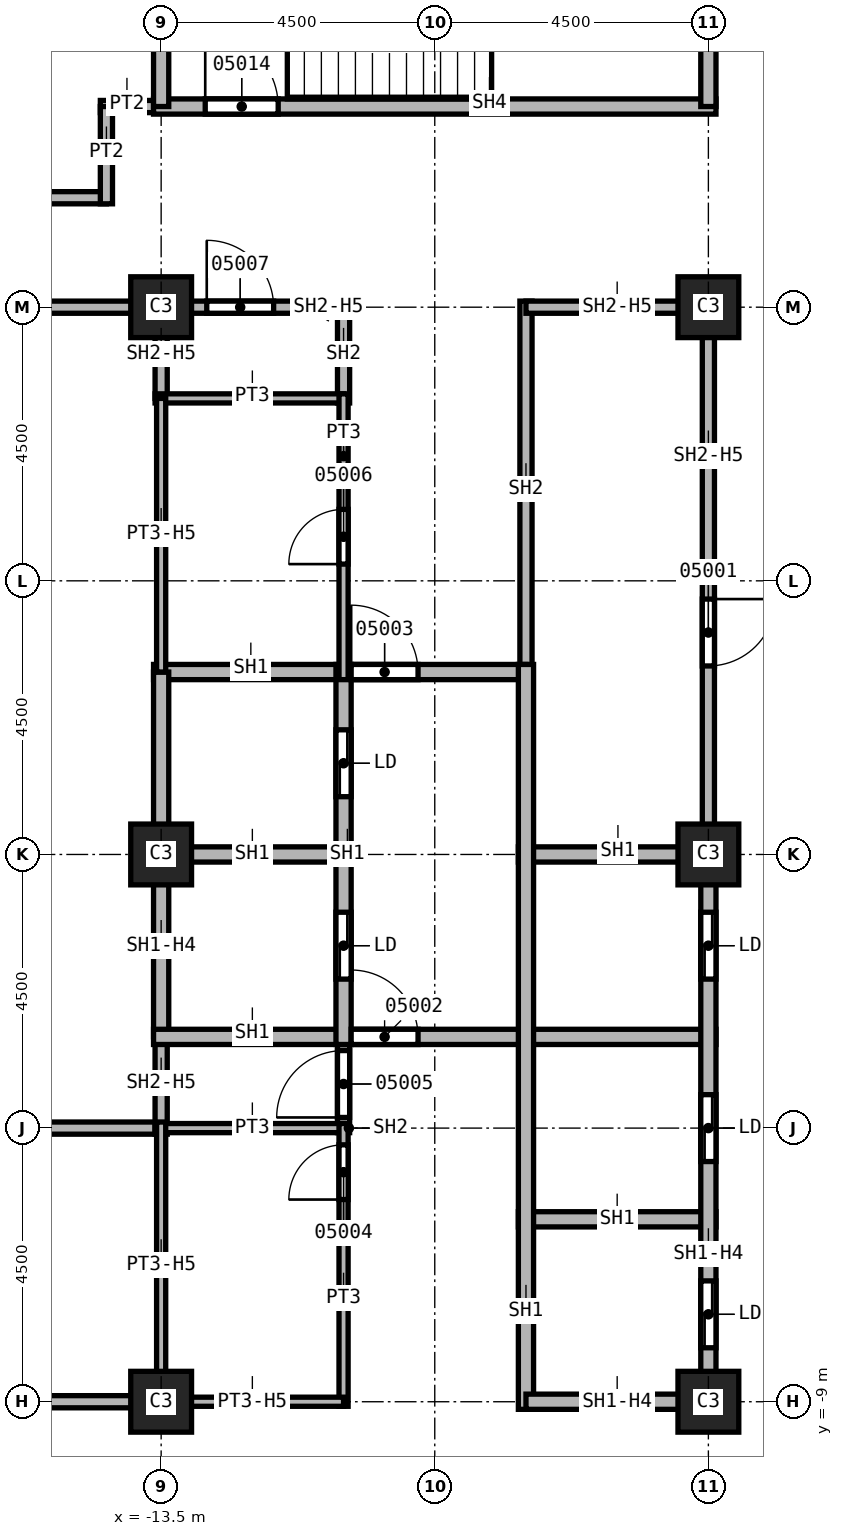
"""IFC4 building model, lengths in metres.
Left out: names, types, materials, properties, quantities, classifications, styles, units other than length and angle.
Written with IfcOpenShell. Run it as: python <this file> out.ifc"""

import sys

from ifc_helpers import new_model, si_unit, direction, frame, frame_2d, origin, origin_2d, place, context, subcontext, project, spatial, rectangle, extrude, element, fill, save


model = new_model("IFC4")
c1 = context("Model", 3, precision=1e-05, world=origin(), true_north=direction((0.0, 1.0)))
c2 = subcontext(c1, "Body", "Model", "MODEL_VIEW")
j1 = project(units=[si_unit("LENGTHUNIT", "METRE"), si_unit("PLANEANGLEUNIT", "RADIAN")], contexts=[c1])
p1 = place(None, origin())
s1 = spatial("IfcSite", under=j1, at=p1, CompositionType="ELEMENT")
p2 = place(p1, origin())
s2 = spatial("IfcBuilding", under=s1, at=p2, CompositionType="ELEMENT")
p3 = place(p2, frame((0.0, 0.0, 112.0)))
s3 = spatial("IfcBuildingStorey", under=s2, at=p3, CompositionType="ELEMENT", Elevation=112.0)
for number, where, z_axis, x_axis in (
    (1, (-4.5, 0.0, 0.0), (0.0, 0.0, 1.0), (1.0, 0.0, 0.0)),
    (2, (-4.5, 9.0, 0.0), (0.0, 0.0, 1.0), (1.0, 0.0, 0.0)),
    (3, (-4.5, -9.0, 0.0), (0.0, 0.0, 1.0), (1.0, 0.0, 0.0)),
    (4, (-13.5, 0.0, 0.0), (0.0, 0.0, 1.0), (1.0, 0.0, 0.0)),
    (5, (-13.5, 9.0, 0.0), (0.0, 0.0, 1.0), (1.0, 0.0, 0.0)),
    (6, (-13.5, -9.0, 0.0), (0.0, 0.0, 1.0), (1.0, 0.0, 0.0)),
):
    element("IfcColumn", number, at=place(p3, frame(where, z_axis=z_axis, x_axis=x_axis)), inside=s3, PredefinedType="COLUMN", context=c2, shape_type="SweptSolid", body=[
        extrude(rectangle(XDim=1.0, YDim=1.0, at=origin_2d()), origin(), (0.0, 0.0, 1.0), 3.7),
    ])
for number, where, z_axis, x_axis in (
    (7, (-18.0, -9.0, 0.0), (0.0, 0.0, 1.0), (1.0, 0.0, 0.0)),
    (8, (-18.0, -4.5, 0.0), (0.0, 0.0, 1.0), (1.0, 0.0, 0.0)),
):
    element("IfcWall", number, at=place(p3, frame(where, z_axis=z_axis, x_axis=x_axis)), inside=s3, PredefinedType="PARTITIONING", context=c2, shape_type="SweptSolid", body=[
        extrude(rectangle(XDim=4.5, YDim=0.2, at=frame_2d((2.25, 0.0))), origin(), (0.0, 0.0, 1.0), 3.7),
    ])
p4 = place(p3, frame((-18.0, 10.8, 0.0), z_axis=(0.0, 0.0, 1.0), x_axis=(1.0, 0.0, 0.0)))
e9 = element("IfcWall", 9, at=p4, inside=s3, PredefinedType="PARTITIONING", context=c2, shape_type="SweptSolid", body=[
    extrude(rectangle(XDim=3.6, YDim=0.2, at=frame_2d((1.8, 0.0))), origin(), (0.0, 0.0, 1.0), 3.7),
])
p5 = place(p4, frame((0.25, 0.0, 0.0)))
e10 = element("IfcOpeningElement", 10, at=p5, cuts=e9, PredefinedType="OPENING", context=c2, shape_type="SweptSolid", body=[
    extrude(rectangle(XDim=1.0, YDim=2.1, at=frame_2d((0.5, 1.05))), frame((0.0, 0.1, 0.0), z_axis=(0.0, -1.0, 0.0), x_axis=(1.0, 0.0, 0.0)), (0.0, 0.0, 1.0), 0.2),
])
p6 = place(p3, frame((-14.5, 12.3, 0.0), z_axis=(0.0, 0.0, 1.0), x_axis=(1.0, 0.0, 0.0)))
e11 = element("IfcWall", 11, at=p6, inside=s3, PredefinedType="PARTITIONING", context=c2, shape_type="SweptSolid", body=[
    extrude(rectangle(XDim=1.125, YDim=0.2, at=frame_2d((0.562, 0.0))), origin(), (0.0, 0.0, 1.0), 3.7),
])
p7 = place(p3, frame((-13.5, 9.0, 0.0), z_axis=(0.0, 0.0, 1.0), x_axis=(-1.0, 0.0, 0.0)))
e12 = element("IfcWall", 12, at=p7, inside=s3, PredefinedType="PARTITIONING", context=c2, shape_type="SweptSolid", body=[
    extrude(rectangle(XDim=4.5, YDim=0.2, at=frame_2d((2.25, 0.0))), origin(), (0.0, 0.0, 1.0), 3.7),
])
p8 = place(p3, frame((-14.4, 10.7, 0.0), z_axis=(0.0, 0.0, 1.0), x_axis=(0.0, 1.0, 0.0)))
e13 = element("IfcWall", 13, at=p8, inside=s3, PredefinedType="PARTITIONING", context=c2, shape_type="SweptSolid", body=[
    extrude(rectangle(XDim=1.6, YDim=0.2, at=frame_2d((0.8, 0.0))), origin(), (0.0, 0.0, 1.0), 3.7),
])
p9 = place(p3, frame((-13.6, 9.0, 0.0), z_axis=(0.0, 0.0, 1.0), x_axis=(1.0, 0.0, 0.0)))
e14 = element("IfcWall", 14, at=p9, inside=s3, PredefinedType="SOLIDWALL", context=c2, shape_type="SweptSolid", body=[
    extrude(rectangle(XDim=3.1, YDim=0.2, at=frame_2d((1.55, 0.0))), origin(), (0.0, 0.0, 1.0), 2.938),
])
p10 = place(p9, frame((0.85, 0.0, 0.0)))
e15 = element("IfcOpeningElement", 15, at=p10, cuts=e14, PredefinedType="OPENING", context=c2, shape_type="SweptSolid", body=[
    extrude(rectangle(XDim=1.1, YDim=2.1, at=frame_2d((0.55, 1.05))), frame((0.0, 0.1, 0.0), z_axis=(0.0, -1.0, 0.0), x_axis=(1.0, 0.0, 0.0)), (0.0, 0.0, 1.0), 0.2),
])
for number, where, z_axis, x_axis in (
    (16, (-13.5, -4.6, 0.0), (0.0, 0.0, 1.0), (0.0, 1.0, 0.0)),
    (17, (-13.5, 7.5, 0.0), (0.0, 0.0, 1.0), (0.0, 1.0, 0.0)),
):
    element("IfcWall", number, at=place(p3, frame(where, z_axis=z_axis, x_axis=x_axis)), inside=s3, PredefinedType="SOLIDWALL", context=c2, shape_type="SweptSolid", body=[
        extrude(rectangle(XDim=1.6, YDim=0.2, at=frame_2d((0.8, 0.0))), origin(), (0.0, 0.0, 1.0), 2.938),
    ])
p11 = place(p3, frame((-10.5, -4.575, 0.0), z_axis=(0.0, 0.0, 1.0), x_axis=(0.0, 1.0, 0.0)))
e18 = element("IfcWall", 18, at=p11, inside=s3, PredefinedType="SOLIDWALL", context=c2, shape_type="SweptSolid", body=[
    extrude(rectangle(XDim=1.7, YDim=0.2, at=frame_2d((0.85, 0.0))), origin(), (0.0, 0.0, 1.0), 3.7),
])
p12 = place(p11, frame((0.25, 0.0, 0.0)))
e19 = element("IfcOpeningElement", 19, at=p12, cuts=e18, PredefinedType="OPENING", context=c2, shape_type="SweptSolid", body=[
    extrude(rectangle(XDim=1.1, YDim=2.1, at=frame_2d((0.55, 1.05))), frame((0.0, 0.1, 0.0), z_axis=(0.0, -1.0, 0.0), x_axis=(1.0, 0.0, 0.0)), (0.0, 0.0, 1.0), 0.2),
])
p13 = place(p3, frame((-10.5, 7.425, 0.0), z_axis=(0.0, 0.0, 1.0), x_axis=(0.0, 1.0, 0.0)))
e20 = element("IfcWall", 20, at=p13, inside=s3, PredefinedType="SOLIDWALL", context=c2, shape_type="SweptSolid", body=[
    extrude(rectangle(XDim=1.675, YDim=0.2, at=frame_2d((0.837, 0.0))), origin(), (0.0, 0.0, 1.0), 3.7),
])
p14 = place(p3, frame((-7.5, 2.875, 0.0), z_axis=(0.0, 0.0, 1.0), x_axis=(0.0, 1.0, 0.0)))
e21 = element("IfcWall", 21, at=p14, inside=s3, PredefinedType="SOLIDWALL", context=c2, shape_type="SweptSolid", body=[
    extrude(rectangle(XDim=6.225, YDim=0.2, at=frame_2d((3.113, 0.0))), origin(), (0.0, 0.0, 1.0), 3.7),
])
p15 = place(p3, frame((-7.5, 9.0, 0.0), z_axis=(0.0, 0.0, 1.0), x_axis=(1.0, 0.0, 0.0)))
e22 = element("IfcWall", 22, at=p15, inside=s3, PredefinedType="SOLIDWALL", context=c2, shape_type="SweptSolid", body=[
    extrude(rectangle(XDim=3.0, YDim=0.2, at=frame_2d((1.5, 0.0))), origin(), (0.0, 0.0, 1.0), 2.938),
])
p16 = place(p3, frame((-4.5, 9.1, 0.0), z_axis=(0.0, 0.0, 1.0), x_axis=(0.0, -1.0, 0.0)))
e23 = element("IfcWall", 23, at=p16, inside=s3, PredefinedType="SOLIDWALL", context=c2, shape_type="SweptSolid", body=[
    extrude(rectangle(XDim=9.1, YDim=0.2, at=frame_2d((4.55, 0.0))), origin(), (0.0, 0.0, 1.0), 2.938),
])
p17 = place(p16, frame((4.9, 0.0, 0.0)))
e24 = element("IfcOpeningElement", 24, at=p17, cuts=e23, PredefinedType="OPENING", context=c2, shape_type="SweptSolid", body=[
    extrude(rectangle(XDim=1.1, YDim=2.1, at=frame_2d((0.55, 1.05))), frame((0.0, 0.1, 0.0), z_axis=(0.0, -1.0, 0.0), x_axis=(1.0, 0.0, 0.0)), (0.0, 0.0, 1.0), 0.2),
])
p18 = place(p3, frame((-13.625, 0.0, 0.0), z_axis=(0.0, 0.0, 1.0), x_axis=(1.0, 0.0, 0.0)))
e25 = element("IfcWall", 25, at=p18, inside=s3, PredefinedType="SOLIDWALL", context=c2, shape_type="SweptSolid", body=[
    extrude(rectangle(XDim=3.125, YDim=0.25, at=frame_2d((1.562, 0.0))), origin(), (0.0, 0.0, 1.0), 3.7),
])
p19 = place(p3, frame((-13.625, 3.0, 0.0), z_axis=(0.0, 0.0, 1.0), x_axis=(1.0, 0.0, 0.0)))
e26 = element("IfcWall", 26, at=p19, inside=s3, PredefinedType="SOLIDWALL", context=c2, shape_type="SweptSolid", body=[
    extrude(rectangle(XDim=6.125, YDim=0.25, at=frame_2d((3.062, 0.0))), origin(), (0.0, 0.0, 1.0), 3.7),
])
p20 = place(p19, frame((3.25, 0.0, 0.0)))
e27 = element("IfcOpeningElement", 27, at=p20, cuts=e26, PredefinedType="OPENING", context=c2, shape_type="SweptSolid", body=[
    extrude(rectangle(XDim=1.1, YDim=2.1, at=frame_2d((0.55, 1.05))), frame((0.0, 0.125, 0.0), z_axis=(0.0, -1.0, 0.0), x_axis=(1.0, 0.0, 0.0)), (0.0, 0.0, 1.0), 0.25),
])
p21 = place(p3, frame((-13.5, -3.0, 0.0), z_axis=(0.0, 0.0, 1.0), x_axis=(0.0, 1.0, 0.0)))
e28 = element("IfcWall", 28, at=p21, inside=s3, PredefinedType="SOLIDWALL", context=c2, shape_type="SweptSolid", body=[
    extrude(rectangle(XDim=6.0, YDim=0.25, at=frame_2d((3.0, 0.0))), origin(), (0.0, 0.0, 1.0), 2.938),
])
p22 = place(p3, frame((-13.625, -3.0, 0.0), z_axis=(0.0, 0.0, 1.0), x_axis=(1.0, 0.0, 0.0)))
e29 = element("IfcWall", 29, at=p22, inside=s3, PredefinedType="SOLIDWALL", context=c2, shape_type="SweptSolid", body=[
    extrude(rectangle(XDim=9.25, YDim=0.25, at=frame_2d((4.625, 0.0))), origin(), (0.0, 0.0, 1.0), 3.7),
])
p23 = place(p22, frame((3.25, 0.0, 0.0)))
e30 = element("IfcOpeningElement", 30, at=p23, cuts=e29, PredefinedType="OPENING", context=c2, shape_type="SweptSolid", body=[
    extrude(rectangle(XDim=1.1, YDim=2.1, at=frame_2d((0.55, 1.05))), frame((0.0, 0.125, 0.0), z_axis=(0.0, -1.0, 0.0), x_axis=(1.0, 0.0, 0.0)), (0.0, 0.0, 1.0), 0.25),
])
p24 = place(p3, frame((-10.5, -3.125, 0.0), z_axis=(0.0, 0.0, 1.0), x_axis=(0.0, 1.0, 0.0)))
e31 = element("IfcWall", 31, at=p24, inside=s3, PredefinedType="SOLIDWALL", context=c2, shape_type="SweptSolid", body=[
    extrude(rectangle(XDim=6.25, YDim=0.25, at=frame_2d((3.125, 0.0))), origin(), (0.0, 0.0, 1.0), 3.7),
])
p25 = place(p24, frame((1.075, 0.0, 0.0)))
e32 = element("IfcOpeningElement", 32, at=p25, cuts=e31, PredefinedType="OPENING", context=c2, shape_type="SweptSolid", body=[
    extrude(rectangle(XDim=1.1, YDim=2.1, at=frame_2d((0.55, 1.05))), frame((0.0, 0.125, 0.0), z_axis=(0.0, -1.0, 0.0), x_axis=(1.0, 0.0, 0.0)), (0.0, 0.0, 1.0), 0.25),
])
p26 = place(p24, frame((4.075, 0.0, 0.0)))
e33 = element("IfcOpeningElement", 33, at=p26, cuts=e31, PredefinedType="OPENING", context=c2, shape_type="SweptSolid", body=[
    extrude(rectangle(XDim=1.1, YDim=2.1, at=frame_2d((0.55, 1.05))), frame((0.0, 0.125, 0.0), z_axis=(0.0, -1.0, 0.0), x_axis=(1.0, 0.0, 0.0)), (0.0, 0.0, 1.0), 0.25),
])
for number, where, z_axis, x_axis in (
    (34, (-7.625, -6.0, 0.0), (0.0, 0.0, 1.0), (1.0, 0.0, 0.0)),
    (35, (-7.625, 0.0, 0.0), (0.0, 0.0, 1.0), (1.0, 0.0, 0.0)),
):
    element("IfcWall", number, at=place(p3, frame(where, z_axis=z_axis, x_axis=x_axis)), inside=s3, PredefinedType="SOLIDWALL", context=c2, shape_type="SweptSolid", body=[
        extrude(rectangle(XDim=3.25, YDim=0.25, at=frame_2d((1.625, 0.0))), origin(), (0.0, 0.0, 1.0), 3.7),
    ])
p27 = place(p3, frame((-7.5, -9.125, 0.0), z_axis=(0.0, 0.0, 1.0), x_axis=(0.0, 1.0, 0.0)))
e36 = element("IfcWall", 36, at=p27, inside=s3, PredefinedType="SOLIDWALL", context=c2, shape_type="SweptSolid", body=[
    extrude(rectangle(XDim=12.25, YDim=0.25, at=frame_2d((6.125, 0.0))), origin(), (0.0, 0.0, 1.0), 3.7),
])
p28 = place(p3, frame((-4.5, -9.0, 0.0), z_axis=(0.0, 0.0, 1.0), x_axis=(-1.0, 0.0, 0.0)))
e37 = element("IfcWall", 37, at=p28, inside=s3, PredefinedType="SOLIDWALL", context=c2, shape_type="SweptSolid", body=[
    extrude(rectangle(XDim=3.0, YDim=0.25, at=frame_2d((1.5, 0.0))), origin(), (0.0, 0.0, 1.0), 2.938),
])
p29 = place(p3, frame((-4.5, 0.0, 0.0), z_axis=(0.0, 0.0, 1.0), x_axis=(0.0, -1.0, 0.0)))
e38 = element("IfcWall", 38, at=p29, inside=s3, PredefinedType="SOLIDWALL", context=c2, shape_type="SweptSolid", body=[
    extrude(rectangle(XDim=9.125, YDim=0.25, at=frame_2d((4.562, 0.0))), origin(), (0.0, 0.0, 1.0), 2.938),
])
p30 = place(p29, frame((7.012, 0.0, 0.0)))
e39 = element("IfcOpeningElement", 39, at=p30, cuts=e38, PredefinedType="OPENING", context=c2, shape_type="SweptSolid", body=[
    extrude(rectangle(XDim=1.1, YDim=2.1, at=frame_2d((0.55, 1.05))), frame((0.0, 0.125, 0.0), z_axis=(0.0, -1.0, 0.0), x_axis=(1.0, 0.0, 0.0)), (0.0, 0.0, 1.0), 0.25),
])
p31 = place(p29, frame((3.95, 0.0, 0.0)))
e40 = element("IfcOpeningElement", 40, at=p31, cuts=e38, PredefinedType="OPENING", context=c2, shape_type="SweptSolid", body=[
    extrude(rectangle(XDim=1.1, YDim=2.1, at=frame_2d((0.55, 1.05))), frame((0.0, 0.125, 0.0), z_axis=(0.0, -1.0, 0.0), x_axis=(1.0, 0.0, 0.0)), (0.0, 0.0, 1.0), 0.25),
])
p32 = place(p29, frame((0.95, 0.0, 0.0)))
e41 = element("IfcOpeningElement", 41, at=p32, cuts=e38, PredefinedType="OPENING", context=c2, shape_type="SweptSolid", body=[
    extrude(rectangle(XDim=1.1, YDim=2.1, at=frame_2d((0.55, 1.05))), frame((0.0, 0.125, 0.0), z_axis=(0.0, -1.0, 0.0), x_axis=(1.0, 0.0, 0.0)), (0.0, 0.0, 1.0), 0.25),
])
p33 = place(p3, frame((-13.625, 12.3, 0.0), z_axis=(0.0, 0.0, 1.0), x_axis=(1.0, 0.0, 0.0)))
e42 = element("IfcWall", 42, at=p33, inside=s3, PredefinedType="SOLIDWALL", context=c2, shape_type="SweptSolid", body=[
    extrude(rectangle(XDim=9.25, YDim=0.25, at=frame_2d((4.625, 0.0))), origin(), (0.0, 0.0, 1.0), 3.7),
])
p34 = place(p33, frame((0.85, 0.0, 0.0)))
e43 = element("IfcOpeningElement", 43, at=p34, cuts=e42, PredefinedType="OPENING", context=c2, shape_type="SweptSolid", body=[
    extrude(rectangle(XDim=1.2, YDim=2.1, at=frame_2d((0.6, 1.05))), frame((0.0, 0.125, 0.0), z_axis=(0.0, -1.0, 0.0), x_axis=(1.0, 0.0, 0.0)), (0.0, 0.0, 1.0), 0.25),
])
for number, where, z_axis, x_axis in (
    (44, (-13.5, 12.3, 0.0), (0.0, 0.0, 1.0), (0.0, 1.0, 0.0)),
    (45, (-4.5, 16.8, 0.0), (0.0, 0.0, 1.0), (0.0, -1.0, 0.0)),
):
    element("IfcWall", number, at=place(p3, frame(where, z_axis=z_axis, x_axis=x_axis)), inside=s3, PredefinedType="SOLIDWALL", context=c2, shape_type="SweptSolid", body=[
        extrude(rectangle(XDim=4.5, YDim=0.25, at=frame_2d((2.25, 0.0))), origin(), (0.0, 0.0, 1.0), 3.7),
    ])
for number, where, z_axis, x_axis in (
    (46, (-13.6, -4.5, 0.0), (0.0, 0.0, 1.0), (1.0, 0.0, 0.0)),
    (47, (-13.6, 7.5, 0.0), (0.0, 0.0, 1.0), (1.0, 0.0, 0.0)),
):
    element("IfcWall", number, at=place(p3, frame(where, z_axis=z_axis, x_axis=x_axis)), inside=s3, PredefinedType="PARTITIONING", context=c2, shape_type="SweptSolid", body=[
        extrude(rectangle(XDim=3.1, YDim=0.15, at=frame_2d((1.55, 0.0))), origin(), (0.0, 0.0, 1.0), 3.7),
    ])
p35 = place(p3, frame((-13.5, -9.1, 0.0), z_axis=(0.0, 0.0, 1.0), x_axis=(0.0, 1.0, 0.0)))
e48 = element("IfcWall", 48, at=p35, inside=s3, PredefinedType="PARTITIONING", context=c2, shape_type="SweptSolid", body=[
    extrude(rectangle(XDim=4.7, YDim=0.15, at=frame_2d((2.35, 0.0))), origin(), (0.0, 0.0, 1.0), 2.938),
])
p36 = place(p3, frame((-13.5, 3.0, 0.0), z_axis=(0.0, 0.0, 1.0), x_axis=(0.0, 1.0, 0.0)))
e49 = element("IfcWall", 49, at=p36, inside=s3, PredefinedType="PARTITIONING", context=c2, shape_type="SweptSolid", body=[
    extrude(rectangle(XDim=4.5, YDim=0.15, at=frame_2d((2.25, 0.0))), origin(), (0.0, 0.0, 1.0), 2.938),
])
p37 = place(p3, frame((-10.5, -9.075, 0.0), z_axis=(0.0, 0.0, 1.0), x_axis=(0.0, 1.0, 0.0)))
e50 = element("IfcWall", 50, at=p37, inside=s3, PredefinedType="PARTITIONING", context=c2, shape_type="SweptSolid", body=[
    extrude(rectangle(XDim=4.65, YDim=0.15, at=frame_2d((2.325, 0.0))), origin(), (0.0, 0.0, 1.0), 3.7),
])
p38 = place(p37, frame((3.4, 0.0, 0.0)))
e51 = element("IfcOpeningElement", 51, at=p38, cuts=e50, PredefinedType="OPENING", context=c2, shape_type="SweptSolid", body=[
    extrude(rectangle(XDim=0.9, YDim=2.1, at=frame_2d((0.45, 1.05))), frame((0.0, 0.075, 0.0), z_axis=(0.0, -1.0, 0.0), x_axis=(1.0, 0.0, 0.0)), (0.0, 0.0, 1.0), 0.15),
])
p39 = place(p3, frame((-10.5, -9.0, 0.0), z_axis=(0.0, 0.0, 1.0), x_axis=(-1.0, 0.0, 0.0)))
e52 = element("IfcWall", 52, at=p39, inside=s3, PredefinedType="PARTITIONING", context=c2, shape_type="SweptSolid", body=[
    extrude(rectangle(XDim=3.075, YDim=0.15, at=frame_2d((1.538, 0.0))), origin(), (0.0, 0.0, 1.0), 2.938),
])
p40 = place(p3, frame((-10.5, 2.875, 0.0), z_axis=(0.0, 0.0, 1.0), x_axis=(0.0, 1.0, 0.0)))
e53 = element("IfcWall", 53, at=p40, inside=s3, PredefinedType="PARTITIONING", context=c2, shape_type="SweptSolid", body=[
    extrude(rectangle(XDim=4.7, YDim=0.15, at=frame_2d((2.35, 0.0))), origin(), (0.0, 0.0, 1.0), 3.7),
])
p41 = place(p40, frame((1.9, 0.0, 0.0)))
e54 = element("IfcOpeningElement", 54, at=p41, cuts=e53, PredefinedType="OPENING", context=c2, shape_type="SweptSolid", body=[
    extrude(rectangle(XDim=0.9, YDim=2.1, at=frame_2d((0.45, 1.05))), frame((0.0, 0.075, 0.0), z_axis=(0.0, -1.0, 0.0), x_axis=(1.0, 0.0, 0.0)), (0.0, 0.0, 1.0), 0.15),
])
p42 = place(p17, origin())
e55 = element("IfcDoor", 55, at=p42, inside=s3, OperationType="SINGLE_SWING_RIGHT", PredefinedType="DOOR", context=c2, shape_type="SweptSolid", body=[
    extrude(rectangle(XDim=1.1, YDim=2.1, at=frame_2d((0.55, 1.05))), frame((0.0, 0.025, 0.0), z_axis=(0.0, -1.0, 0.0), x_axis=(1.0, 0.0, 0.0)), (0.0, 0.0, 1.0), 0.05),
])
fill(e24, e55)
p43 = place(p23, origin())
e56 = element("IfcDoor", 56, at=p43, inside=s3, OperationType="SINGLE_SWING_LEFT", PredefinedType="DOOR", context=c2, shape_type="SweptSolid", body=[
    extrude(rectangle(XDim=1.1, YDim=2.1, at=frame_2d((0.55, 1.05))), frame((0.0, 0.025, 0.0), z_axis=(0.0, -1.0, 0.0), x_axis=(1.0, 0.0, 0.0)), (0.0, 0.0, 1.0), 0.05),
])
fill(e30, e56)
p44 = place(p20, origin())
e57 = element("IfcDoor", 57, at=p44, inside=s3, OperationType="SINGLE_SWING_RIGHT", PredefinedType="DOOR", context=c2, shape_type="SweptSolid", body=[
    extrude(rectangle(XDim=1.1, YDim=2.1, at=frame_2d((0.55, 1.05))), frame((0.0, 0.025, 0.0), z_axis=(0.0, -1.0, 0.0), x_axis=(1.0, 0.0, 0.0)), (0.0, 0.0, 1.0), 0.05),
])
fill(e27, e57)
p45 = place(p38, origin())
e58 = element("IfcDoor", 58, at=p45, inside=s3, OperationType="SINGLE_SWING_LEFT", PredefinedType="DOOR", context=c2, shape_type="SweptSolid", body=[
    extrude(rectangle(XDim=0.9, YDim=2.1, at=frame_2d((0.45, 1.05))), frame((0.0, 0.025, 0.0), z_axis=(0.0, -1.0, 0.0), x_axis=(1.0, 0.0, 0.0)), (0.0, 0.0, 1.0), 0.05),
])
fill(e51, e58)
p46 = place(p12, origin())
e59 = element("IfcDoor", 59, at=p46, inside=s3, OperationType="SINGLE_SWING_RIGHT", PredefinedType="DOOR", context=c2, shape_type="SweptSolid", body=[
    extrude(rectangle(XDim=1.1, YDim=2.1, at=frame_2d((0.55, 1.05))), frame((0.0, 0.025, 0.0), z_axis=(0.0, -1.0, 0.0), x_axis=(1.0, 0.0, 0.0)), (0.0, 0.0, 1.0), 0.05),
])
fill(e19, e59)
p47 = place(p41, origin())
e60 = element("IfcDoor", 60, at=p47, inside=s3, OperationType="SINGLE_SWING_LEFT", PredefinedType="DOOR", context=c2, shape_type="SweptSolid", body=[
    extrude(rectangle(XDim=0.9, YDim=2.1, at=frame_2d((0.45, 1.05))), frame((0.0, 0.025, 0.0), z_axis=(0.0, -1.0, 0.0), x_axis=(1.0, 0.0, 0.0)), (0.0, 0.0, 1.0), 0.05),
])
fill(e54, e60)
p48 = place(p10, origin())
e61 = element("IfcDoor", 61, at=p48, inside=s3, OperationType="SINGLE_SWING_RIGHT", PredefinedType="DOOR", context=c2, shape_type="SweptSolid", body=[
    extrude(rectangle(XDim=1.1, YDim=2.1, at=frame_2d((0.55, 1.05))), frame((0.0, 0.025, 0.0), z_axis=(0.0, -1.0, 0.0), x_axis=(1.0, 0.0, 0.0)), (0.0, 0.0, 1.0), 0.05),
])
fill(e15, e61)
p49 = place(p34, origin())
e62 = element("IfcDoor", 62, at=p49, inside=s3, OperationType="SINGLE_SWING_LEFT", PredefinedType="DOOR", context=c2, shape_type="SweptSolid", body=[
    extrude(rectangle(XDim=1.2, YDim=2.1, at=frame_2d((0.6, 1.05))), frame((0.0, 0.025, 0.0), z_axis=(0.0, -1.0, 0.0), x_axis=(1.0, 0.0, 0.0)), (0.0, 0.0, 1.0), 0.05),
])
fill(e43, e62)
p50 = place(p30, origin())
e63 = element("IfcDoor", 63, at=p50, inside=s3, OperationType="SLIDING_TO_LEFT", PredefinedType="DOOR", context=c2, shape_type="SweptSolid", body=[
    extrude(rectangle(XDim=1.1, YDim=2.1, at=frame_2d((0.55, 1.05))), frame((0.0, 0.025, 0.0), z_axis=(0.0, -1.0, 0.0), x_axis=(1.0, 0.0, 0.0)), (0.0, 0.0, 1.0), 0.05),
])
fill(e39, e63)
p51 = place(p31, origin())
e64 = element("IfcDoor", 64, at=p51, inside=s3, OperationType="SLIDING_TO_LEFT", PredefinedType="DOOR", context=c2, shape_type="SweptSolid", body=[
    extrude(rectangle(XDim=1.1, YDim=2.1, at=frame_2d((0.55, 1.05))), frame((0.0, 0.025, 0.0), z_axis=(0.0, -1.0, 0.0), x_axis=(1.0, 0.0, 0.0)), (0.0, 0.0, 1.0), 0.05),
])
fill(e40, e64)
p52 = place(p32, origin())
e65 = element("IfcDoor", 65, at=p52, inside=s3, OperationType="SLIDING_TO_LEFT", PredefinedType="DOOR", context=c2, shape_type="SweptSolid", body=[
    extrude(rectangle(XDim=1.1, YDim=2.1, at=frame_2d((0.55, 1.05))), frame((0.0, 0.025, 0.0), z_axis=(0.0, -1.0, 0.0), x_axis=(1.0, 0.0, 0.0)), (0.0, 0.0, 1.0), 0.05),
])
fill(e41, e65)
p53 = place(p25, origin())
e66 = element("IfcDoor", 66, at=p53, inside=s3, OperationType="SLIDING_TO_LEFT", PredefinedType="DOOR", context=c2, shape_type="SweptSolid", body=[
    extrude(rectangle(XDim=1.1, YDim=2.1, at=frame_2d((0.55, 1.05))), frame((0.0, 0.025, 0.0), z_axis=(0.0, -1.0, 0.0), x_axis=(1.0, 0.0, 0.0)), (0.0, 0.0, 1.0), 0.05),
])
fill(e32, e66)
p54 = place(p26, origin())
e67 = element("IfcDoor", 67, at=p54, inside=s3, OperationType="SLIDING_TO_LEFT", PredefinedType="DOOR", context=c2, shape_type="SweptSolid", body=[
    extrude(rectangle(XDim=1.1, YDim=2.1, at=frame_2d((0.55, 1.05))), frame((0.0, 0.025, 0.0), z_axis=(0.0, -1.0, 0.0), x_axis=(1.0, 0.0, 0.0)), (0.0, 0.0, 1.0), 0.05),
])
fill(e33, e67)
save(model, sys.argv[1])
